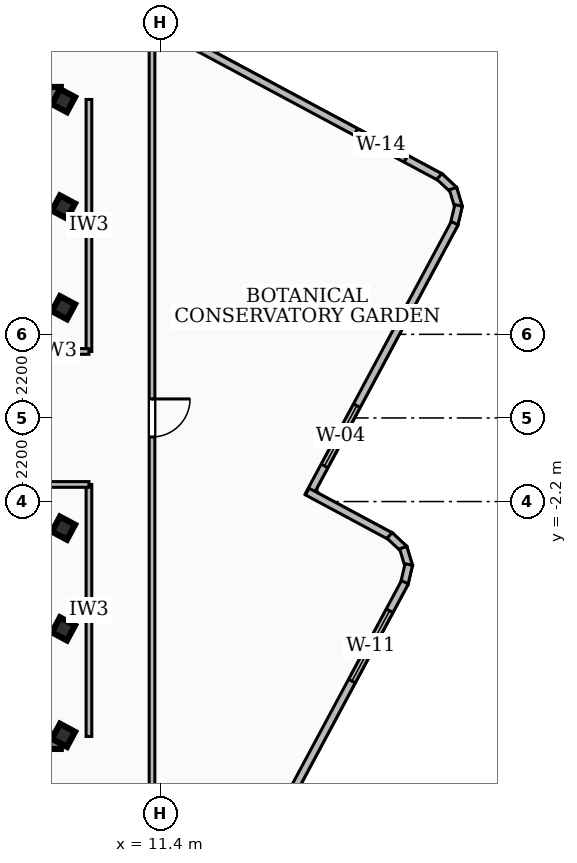
"""IFC4 building model, lengths in metres.
Left out: names, types, materials, properties, quantities, classifications, styles, units other than length and angle.
Written with IfcOpenShell. Run it as: python <this file> out.ifc"""

import sys

from ifc_helpers import new_model, si_unit, direction, frame, frame_2d, origin, origin_2d, place, context, subcontext, project, spatial, rectangle, hollow_rectangle, extrude, element, fill, save


model = new_model("IFC4")
c1 = context("Model", 3, precision=1e-05, world=origin(), true_north=direction((0.0, 1.0)))
c2 = subcontext(c1, "Body", "Model", "MODEL_VIEW")
j1 = project(units=[si_unit("LENGTHUNIT", "METRE"), si_unit("PLANEANGLEUNIT", "RADIAN")], contexts=[c1])
p1 = place(None, origin())
s1 = spatial("IfcSite", under=j1, at=p1, CompositionType="ELEMENT")
p2 = place(p1, origin())
s2 = spatial("IfcBuilding", under=s1, at=p2, CompositionType="ELEMENT")
p3 = place(p2, frame((0.0, 0.0, 285.12)))
s3 = spatial("IfcBuildingStorey", under=s2, at=p3, CompositionType="ELEMENT", Elevation=285.12)
for number, where, z_axis, x_axis in (
    (1, (-8.78, 8.51, 0.0), (0.0, 0.0, 1.0), (1.0, 0.0, 0.0)),
    (2, (8.78, -8.51, 0.0), (0.0, 0.0, 1.0), (-1.0, 0.0, 0.0)),
):
    element("IfcWall", number, at=place(p3, frame(where, z_axis=z_axis, x_axis=x_axis)), inside=s3, PredefinedType="SHEAR", context=c2, shape_type="SweptSolid", body=[
        extrude(rectangle(XDim=17.56, YDim=0.4, at=frame_2d((8.78, 0.0))), origin(), (0.0, 0.0, 1.0), 3.84),
    ])
for number, where, z_axis, x_axis in (
    (3, (8.85, -5.55, 0.0), (0.0, 0.0, 1.0), (0.473, 0.881, 0.0)),
    (4, (8.85, -2.9, 0.0), (0.0, 0.0, 1.0), (0.473, 0.881, 0.0)),
    (5, (8.85, 2.9, 0.0), (0.0, 0.0, 1.0), (0.473, 0.881, 0.0)),
    (6, (8.85, 5.55, 0.0), (0.0, 0.0, 1.0), (0.473, 0.881, 0.0)),
    (7, (8.85, -8.35, 0.0), (0.0, 0.0, 1.0), (0.473, 0.881, 0.0)),
    (8, (8.85, 8.35, 0.0), (0.0, 0.0, 1.0), (0.473, 0.881, 0.0)),
):
    element("IfcColumn", number, at=place(p3, frame(where, z_axis=z_axis, x_axis=x_axis)), inside=s3, PredefinedType="COLUMN", context=c2, shape_type="SweptSolid", body=[
        extrude(hollow_rectangle(XDim=0.45, YDim=0.45, WallThickness=0.022, at=origin_2d()), origin(), (0.0, 0.0, 1.0), 4.14),
    ])
p4 = place(p3, frame((11.609, 10.171, 0.0), z_axis=(0.0, 0.0, 1.0), x_axis=(0.881311754138, -0.472535281242, 0.0)))
e9 = element("IfcWall", 9, at=p4, inside=s3, PredefinedType="SOLIDWALL", context=c2, shape_type="SweptSolid", body=[
    extrude(rectangle(XDim=8.137, YDim=0.2, at=frame_2d((4.068, 0.0))), origin(), (0.0, 0.0, 1.0), 3.84),
])
p5 = place(p4, frame((5.597, 0.0, 0.85)))
e10 = element("IfcOpeningElement", 10, at=p5, cuts=e9, PredefinedType="OPENING", context=c2, shape_type="SweptSolid", body=[
    extrude(rectangle(XDim=1.5, YDim=1.5, at=frame_2d((0.75, 0.75))), frame((0.0, 0.11, 0.0), z_axis=(0.0, -1.0, 0.0), x_axis=(1.0, 0.0, 0.0)), (0.0, 0.0, 1.0), 0.22),
])
p6 = place(p3, frame((18.74, 6.355, 0.0), z_axis=(0.0, 0.0, 1.0), x_axis=(0.72940737532, -0.684079586619, 0.0)))
e11 = element("IfcWall", 11, at=p6, inside=s3, PredefinedType="SOLIDWALL", context=c2, shape_type="SweptSolid", body=[
    extrude(rectangle(XDim=0.528, YDim=0.2, at=frame_2d((0.264, 0.0))), origin(), (0.0, 0.0, 1.0), 3.84),
])
p7 = place(p3, frame((19.1, 6.035, 0.0), z_axis=(0.0, 0.0, 1.0), x_axis=(0.288001833099, -0.957629857582, 0.0)))
e12 = element("IfcWall", 12, at=p7, inside=s3, PredefinedType="SOLIDWALL", context=c2, shape_type="SweptSolid", body=[
    extrude(rectangle(XDim=0.514, YDim=0.2, at=frame_2d((0.257, 0.0))), origin(), (0.0, 0.0, 1.0), 3.84),
])
p8 = place(p3, frame((19.247, 5.591, 0.0), z_axis=(0.0, 0.0, 1.0), x_axis=(-0.229658673522, -0.973271233355, 0.0)))
e13 = element("IfcWall", 13, at=p8, inside=s3, PredefinedType="SOLIDWALL", context=c2, shape_type="SweptSolid", body=[
    extrude(rectangle(XDim=0.527, YDim=0.2, at=frame_2d((0.264, 0.0))), origin(), (0.0, 0.0, 1.0), 3.84),
])
p9 = place(p3, frame((19.144, 5.124, 0.0), z_axis=(0.0, 0.0, 1.0), x_axis=(-0.472628491439, -0.881261771031, 0.0)))
e14 = element("IfcWall", 14, at=p9, inside=s3, PredefinedType="SOLIDWALL", context=c2, shape_type="SweptSolid", body=[
    extrude(rectangle(XDim=8.137, YDim=0.2, at=frame_2d((4.069, 0.0))), origin(), (0.0, 0.0, 1.0), 3.84),
])
p10 = place(p9, frame((5.447, 0.0, 0.85)))
e15 = element("IfcOpeningElement", 15, at=p10, cuts=e14, PredefinedType="OPENING", context=c2, shape_type="SweptSolid", body=[
    extrude(rectangle(XDim=1.8, YDim=2.0, at=frame_2d((0.9, 1.0))), frame((0.0, 0.11, 0.0), z_axis=(0.0, -1.0, 0.0), x_axis=(1.0, 0.0, 0.0)), (0.0, 0.0, 1.0), 0.22),
])
p11 = place(p3, frame((15.265, -1.938, 0.0), z_axis=(0.0, 0.0, 1.0), x_axis=(0.881265297533, -0.472621915875, 0.0)))
e16 = element("IfcWall", 16, at=p11, inside=s3, PredefinedType="SOLIDWALL", context=c2, shape_type="SweptSolid", body=[
    extrude(rectangle(XDim=2.503, YDim=0.2, at=frame_2d((1.251, 0.0))), origin(), (0.0, 0.0, 1.0), 3.84),
])
p12 = place(p3, frame((17.431, -3.092, 0.0), z_axis=(0.0, 0.0, 1.0), x_axis=(0.728771001466, -0.684757495338, 0.0)))
e17 = element("IfcWall", 17, at=p12, inside=s3, PredefinedType="SOLIDWALL", context=c2, shape_type="SweptSolid", body=[
    extrude(rectangle(XDim=0.527, YDim=0.2, at=frame_2d((0.263, 0.0))), origin(), (0.0, 0.0, 1.0), 3.84),
])
p13 = place(p3, frame((17.79, -3.412, 0.0), z_axis=(0.0, 0.0, 1.0), x_axis=(0.287478448092, -0.957787106763, 0.0)))
e18 = element("IfcWall", 18, at=p13, inside=s3, PredefinedType="SOLIDWALL", context=c2, shape_type="SweptSolid", body=[
    extrude(rectangle(XDim=0.515, YDim=0.2, at=frame_2d((0.257, 0.0))), origin(), (0.0, 0.0, 1.0), 3.84),
])
p14 = place(p3, frame((17.937, -3.857, 0.0), z_axis=(0.0, 0.0, 1.0), x_axis=(-0.229658673522, -0.973271233355, 0.0)))
e19 = element("IfcWall", 19, at=p14, inside=s3, PredefinedType="SOLIDWALL", context=c2, shape_type="SweptSolid", body=[
    extrude(rectangle(XDim=0.527, YDim=0.2, at=frame_2d((0.264, 0.0))), origin(), (0.0, 0.0, 1.0), 3.84),
])
p15 = place(p3, frame((17.834, -4.324, 0.0), z_axis=(0.0, 0.0, 1.0), x_axis=(-0.472635928498, -0.881257782429, 0.0)))
e20 = element("IfcWall", 20, at=p15, inside=s3, PredefinedType="SOLIDWALL", context=c2, shape_type="SweptSolid", body=[
    extrude(rectangle(XDim=9.233, YDim=0.2, at=frame_2d((4.617, 0.0))), origin(), (0.0, 0.0, 1.0), 3.84),
])
p16 = place(p15, frame((0.85, 0.0, 0.85)))
e21 = element("IfcOpeningElement", 21, at=p16, cuts=e20, PredefinedType="OPENING", context=c2, shape_type="SweptSolid", body=[
    extrude(rectangle(XDim=2.1, YDim=1.6, at=frame_2d((1.05, 0.8))), frame((0.0, 0.11, 0.0), z_axis=(0.0, -1.0, 0.0), x_axis=(1.0, 0.0, 0.0)), (0.0, 0.0, 1.0), 0.22),
])
p17 = place(p3, frame((9.52, 1.75, 0.0), z_axis=(0.0, 0.0, 1.0), x_axis=(0.0, 1.0, 0.0)))
e22 = element("IfcWall", 22, at=p17, inside=s3, PredefinedType="PARTITIONING", context=c2, shape_type="SweptSolid", body=[
    extrude(rectangle(XDim=6.63, YDim=0.15, at=frame_2d((3.315, 0.0))), origin(), (0.0, 0.0, 1.0), 3.84),
])
p18 = place(p3, frame((7.85, 1.75, 0.0), z_axis=(0.0, 0.0, 1.0), x_axis=(1.0, 0.0, 0.0)))
e23 = element("IfcWall", 23, at=p18, inside=s3, PredefinedType="PARTITIONING", context=c2, shape_type="SweptSolid", body=[
    extrude(rectangle(XDim=1.67, YDim=0.15, at=frame_2d((0.835, 0.0))), origin(), (0.0, 0.0, 1.0), 3.07),
])
p19 = place(p3, frame((9.52, -8.38, 0.0), z_axis=(0.0, 0.0, 1.0), x_axis=(0.0, 1.0, 0.0)))
e24 = element("IfcWall", 24, at=p19, inside=s3, PredefinedType="PARTITIONING", context=c2, shape_type="SweptSolid", body=[
    extrude(rectangle(XDim=6.63, YDim=0.15, at=frame_2d((3.315, 0.0))), origin(), (0.0, 0.0, 1.0), 3.21),
])
p20 = place(p3, frame((7.85, -1.75, 0.0), z_axis=(0.0, 0.0, 1.0), x_axis=(1.0, 0.0, 0.0)))
e25 = element("IfcWall", 25, at=p20, inside=s3, PredefinedType="PARTITIONING", context=c2, shape_type="SweptSolid", body=[
    extrude(rectangle(XDim=1.67, YDim=0.15, at=frame_2d((0.835, 0.0))), origin(), (0.0, 0.0, 1.0), 3.07),
])
p21 = place(p3, frame((11.18, 18.1, 0.0), z_axis=(0.0, 0.0, 1.0), x_axis=(0.0, -1.0, 0.0)))
e26 = element("IfcWall", 26, at=p21, inside=s3, PredefinedType="PARTITIONING", context=c2, shape_type="SweptSolid", body=[
    extrude(rectangle(XDim=30.267, YDim=0.15, at=frame_2d((15.134, 0.0))), origin(), (0.0, 0.0, 1.0), 3.84),
])
p22 = place(p21, frame((17.6, 0.0, 0.0)))
e27 = element("IfcOpeningElement", 27, at=p22, cuts=e26, PredefinedType="OPENING", context=c2, shape_type="SweptSolid", body=[
    extrude(rectangle(XDim=1.0, YDim=2.1, at=frame_2d((0.5, 1.05))), frame((0.0, 0.085, 0.0), z_axis=(0.0, -1.0, 0.0), x_axis=(1.0, 0.0, 0.0)), (0.0, 0.0, 1.0), 0.17),
])
p23 = place(p5, origin())
e28 = element("IfcWindow", 28, at=p23, inside=s3, PartitioningType="SINGLE_PANEL", PredefinedType="WINDOW", context=c2, shape_type="SweptSolid", body=[
    extrude(rectangle(XDim=1.5, YDim=1.5, at=frame_2d((0.75, 0.75))), frame((0.0, 0.03, 0.0), z_axis=(0.0, -1.0, 0.0), x_axis=(1.0, 0.0, 0.0)), (0.0, 0.0, 1.0), 0.06),
])
fill(e10, e28)
p24 = place(p10, origin())
e29 = element("IfcWindow", 29, at=p24, inside=s3, PartitioningType="SINGLE_PANEL", PredefinedType="WINDOW", context=c2, shape_type="SweptSolid", body=[
    extrude(rectangle(XDim=1.8, YDim=2.0, at=frame_2d((0.9, 1.0))), frame((0.0, 0.03, 0.0), z_axis=(0.0, -1.0, 0.0), x_axis=(1.0, 0.0, 0.0)), (0.0, 0.0, 1.0), 0.06),
])
fill(e15, e29)
p25 = place(p16, origin())
e30 = element("IfcWindow", 30, at=p25, inside=s3, PartitioningType="SINGLE_PANEL", PredefinedType="WINDOW", context=c2, shape_type="SweptSolid", body=[
    extrude(rectangle(XDim=2.1, YDim=1.6, at=frame_2d((1.05, 0.8))), frame((0.0, 0.03, 0.0), z_axis=(0.0, -1.0, 0.0), x_axis=(1.0, 0.0, 0.0)), (0.0, 0.0, 1.0), 0.06),
])
fill(e21, e30)
p26 = place(p22, origin())
e31 = element("IfcDoor", 31, at=p26, inside=s3, OperationType="SINGLE_SWING_LEFT", PredefinedType="DOOR", context=c2, shape_type="SweptSolid", body=[
    extrude(rectangle(XDim=1.0, YDim=2.1, at=frame_2d((0.5, 1.05))), frame((0.0, 0.025, 0.0), z_axis=(0.0, -1.0, 0.0), x_axis=(1.0, 0.0, 0.0)), (0.0, 0.0, 1.0), 0.05),
])
fill(e27, e31)
save(model, sys.argv[1])
